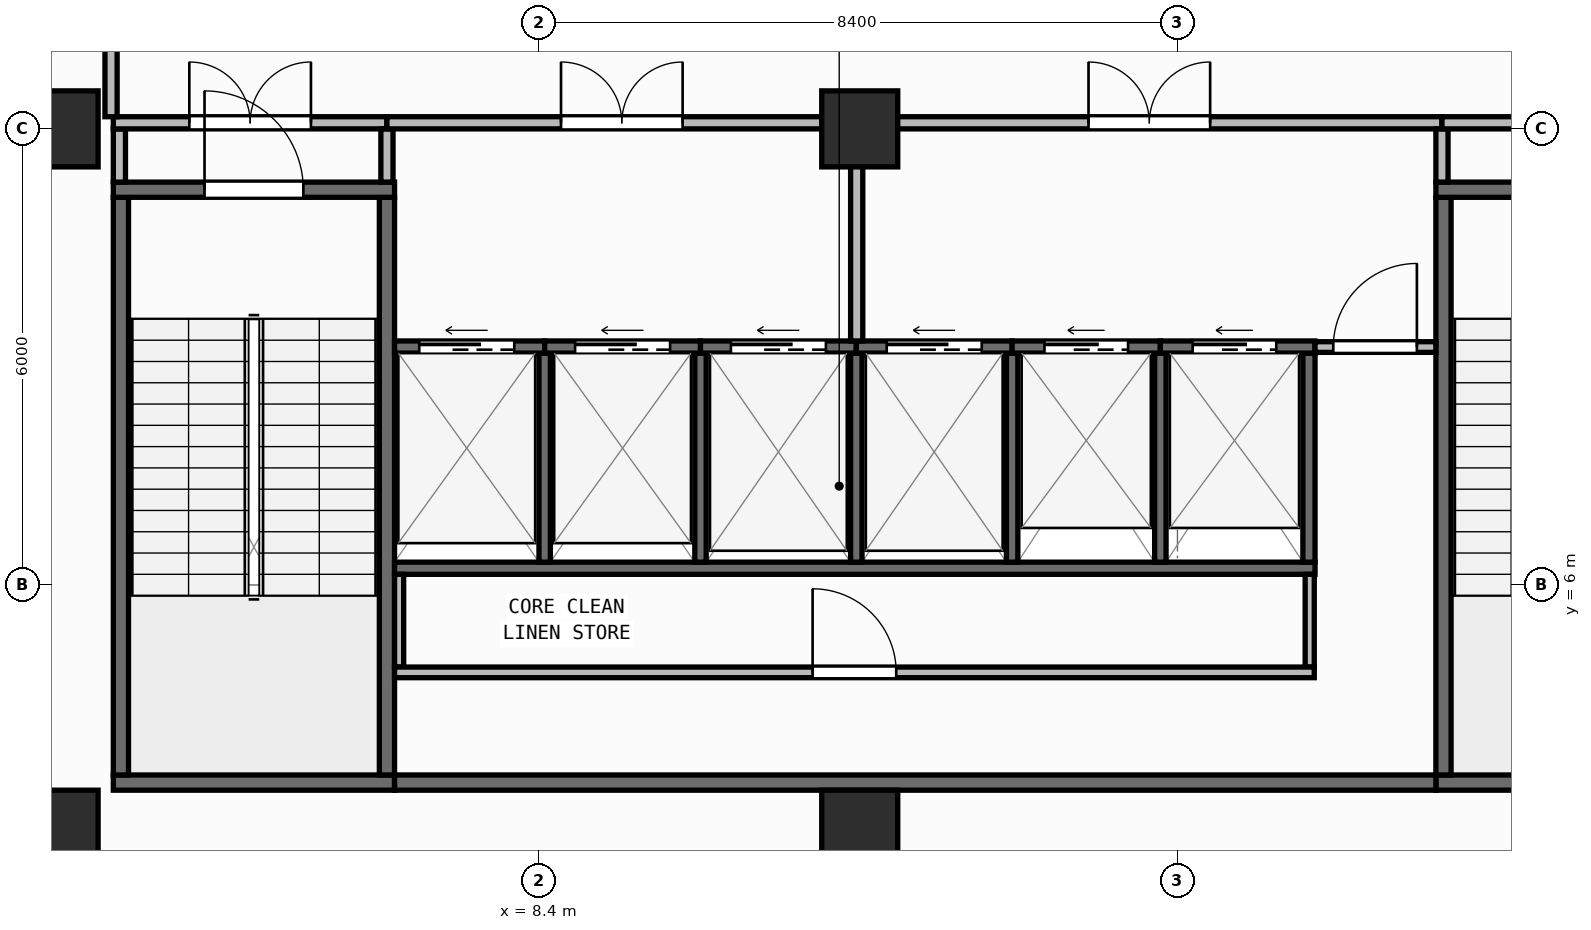
"""IFC4 building model, lengths in metres.
Left out: names, types, materials, properties, quantities, classifications, styles, units other than length and angle.
Written with IfcOpenShell. Run it as: python <this file> out.ifc"""

import sys

from ifc_helpers import new_model, si_unit, direction, frame, frame_2d, origin, origin_2d, place, context, subcontext, project, spatial, rectangle, extrude, element, fill, save


model = new_model("IFC4")
c1 = context("Model", 3, precision=1e-05, world=origin(), true_north=direction((0.0, 1.0)))
c2 = subcontext(c1, "Body", "Model", "MODEL_VIEW")
j1 = project(units=[si_unit("LENGTHUNIT", "METRE"), si_unit("PLANEANGLEUNIT", "RADIAN")], contexts=[c1])
p1 = place(None, origin())
s1 = spatial("IfcSite", under=j1, at=p1, CompositionType="ELEMENT")
p2 = place(p1, origin())
s2 = spatial("IfcBuilding", under=s1, at=p2, CompositionType="ELEMENT")
p3 = place(p2, frame((0.0, 0.0, 235.55)))
s3 = spatial("IfcBuildingStorey", under=s2, at=p3, CompositionType="ELEMENT", Elevation=235.55)
for number, where, z_axis, x_axis in (
    (1, (2.1, 2.8, 0.0), (0.0, 0.0, 1.0), (1.0, 0.0, 0.0)),
    (2, (12.62, 2.8, 0.0), (0.0, 0.0, 1.0), (1.0, 0.0, 0.0)),
    (3, (2.1, 12.0, 0.0), (0.0, 0.0, 1.0), (1.0, 0.0, 0.0)),
    (4, (12.62, 12.0, 0.0), (0.0, 0.0, 1.0), (1.0, 0.0, 0.0)),
):
    element("IfcColumn", number, at=place(p3, frame(where, z_axis=z_axis, x_axis=x_axis)), inside=s3, PredefinedType="COLUMN", context=c2, shape_type="SweptSolid", body=[
        extrude(rectangle(XDim=1.0, YDim=1.0, at=origin_2d()), origin(), (0.0, 0.0, 1.0), 5.2),
    ])
p4 = place(p3, frame((2.66, 0.174, 0.0), z_axis=(0.0, 0.0, 1.0), x_axis=(0.996611813627, 0.082248969229, 0.0)))
e5 = element("IfcWall", 5, at=p4, inside=s3, PredefinedType="STANDARD", context=c2, shape_type="SweptSolid", body=[
    extrude(rectangle(XDim=41.019, YDim=0.26, at=frame_2d((20.51, 0.0))), origin(), (0.0, 0.0, 1.0), 4.96),
])
p5 = place(p3, frame((2.8, 3.4, 0.0), z_axis=(0.0, 0.0, 1.0), x_axis=(1.0, 0.0, 0.0)))
e6 = element("IfcWall", 6, at=p5, inside=s3, PredefinedType="SHEAR", context=c2, shape_type="SweptSolid", body=[
    extrude(rectangle(XDim=3.7, YDim=0.2, at=frame_2d((1.85, 0.0))), origin(), (0.0, 0.0, 1.0), 4.96),
])
for number, where, z_axis, x_axis in (
    (7, (2.9, 3.5, 0.0), (0.0, 0.0, 1.0), (0.0, 1.0, 0.0)),
    (8, (6.4, 3.5, 0.0), (0.0, 0.0, 1.0), (0.0, 1.0, 0.0)),
):
    element("IfcWall", number, at=place(p3, frame(where, z_axis=z_axis, x_axis=x_axis)), inside=s3, PredefinedType="SHEAR", context=c2, shape_type="SweptSolid", body=[
        extrude(rectangle(XDim=7.6, YDim=0.2, at=frame_2d((3.8, 0.0))), origin(), (0.0, 0.0, 1.0), 4.96),
    ])
p6 = place(p3, frame((2.8, 11.2, 0.0), z_axis=(0.0, 0.0, 1.0), x_axis=(1.0, 0.0, 0.0)))
e9 = element("IfcWall", 9, at=p6, inside=s3, PredefinedType="SHEAR", context=c2, shape_type="SweptSolid", body=[
    extrude(rectangle(XDim=3.7, YDim=0.2, at=frame_2d((1.85, 0.0))), origin(), (0.0, 0.0, 1.0), 4.96),
])
p7 = place(p6, frame((1.2, 0.0, 0.0)))
e10 = element("IfcOpeningElement", 10, at=p7, cuts=e9, PredefinedType="OPENING", context=c2, shape_type="SweptSolid", body=[
    extrude(rectangle(XDim=1.3, YDim=2.15, at=frame_2d((0.65, 1.075))), frame((0.0, 0.11, 0.0), z_axis=(0.0, -1.0, 0.0), x_axis=(1.0, 0.0, 0.0)), (0.0, 0.0, 1.0), 0.22),
])
p8 = place(p3, frame((20.2, 3.4, 0.0), z_axis=(0.0, 0.0, 1.0), x_axis=(1.0, 0.0, 0.0)))
e11 = element("IfcWall", 11, at=p8, inside=s3, PredefinedType="SHEAR", context=c2, shape_type="SweptSolid", body=[
    extrude(rectangle(XDim=3.7, YDim=0.2, at=frame_2d((1.85, 0.0))), origin(), (0.0, 0.0, 1.0), 4.96),
])
p9 = place(p3, frame((20.3, 3.5, 0.0), z_axis=(0.0, 0.0, 1.0), x_axis=(0.0, 1.0, 0.0)))
e12 = element("IfcWall", 12, at=p9, inside=s3, PredefinedType="SHEAR", context=c2, shape_type="SweptSolid", body=[
    extrude(rectangle(XDim=7.6, YDim=0.2, at=frame_2d((3.8, 0.0))), origin(), (0.0, 0.0, 1.0), 4.96),
])
p10 = place(p3, frame((20.2, 11.2, 0.0), z_axis=(0.0, 0.0, 1.0), x_axis=(1.0, 0.0, 0.0)))
e13 = element("IfcWall", 13, at=p10, inside=s3, PredefinedType="SHEAR", context=c2, shape_type="SweptSolid", body=[
    extrude(rectangle(XDim=3.7, YDim=0.2, at=frame_2d((1.85, 0.0))), origin(), (0.0, 0.0, 1.0), 4.96),
])
p11 = place(p10, frame((1.2, 0.0, 0.0)))
e14 = element("IfcOpeningElement", 14, at=p11, cuts=e13, PredefinedType="OPENING", context=c2, shape_type="SweptSolid", body=[
    extrude(rectangle(XDim=1.3, YDim=2.15, at=frame_2d((0.65, 1.075))), frame((0.0, 0.11, 0.0), z_axis=(0.0, -1.0, 0.0), x_axis=(1.0, 0.0, 0.0)), (0.0, 0.0, 1.0), 0.22),
])
p12 = place(p3, frame((6.5, 3.4, 0.0), z_axis=(0.0, 0.0, 1.0), x_axis=(1.0, 0.0, 0.0)))
e15 = element("IfcWall", 15, at=p12, inside=s3, PredefinedType="SHEAR", context=c2, shape_type="SweptSolid", body=[
    extrude(rectangle(XDim=13.7, YDim=0.2, at=frame_2d((6.85, 0.0))), origin(), (0.0, 0.0, 1.0), 4.96),
])
p13 = place(p3, frame((6.5, 6.22, 0.0), z_axis=(0.0, 0.0, 1.0), x_axis=(1.0, 0.0, 0.0)))
e16 = element("IfcWall", 16, at=p13, inside=s3, PredefinedType="SHEAR", context=c2, shape_type="SweptSolid", body=[
    extrude(rectangle(XDim=12.11, YDim=0.16, at=frame_2d((6.055, 0.0))), origin(), (0.0, 0.0, 1.0), 4.96),
])
p14 = place(p3, frame((18.53, 6.3, 0.0), z_axis=(0.0, 0.0, 1.0), x_axis=(0.0, 1.0, 0.0)))
e17 = element("IfcWall", 17, at=p14, inside=s3, PredefinedType="SHEAR", context=c2, shape_type="SweptSolid", body=[
    extrude(rectangle(XDim=2.75, YDim=0.16, at=frame_2d((1.375, 0.0))), origin(), (0.0, 0.0, 1.0), 4.96),
])
for number, where, z_axis, x_axis in (
    (18, (8.475, 6.3, 0.0), (0.0, 0.0, 1.0), (0.0, 1.0, 0.0)),
    (19, (10.525, 6.3, 0.0), (0.0, 0.0, 1.0), (0.0, 1.0, 0.0)),
    (20, (12.575, 6.3, 0.0), (0.0, 0.0, 1.0), (0.0, 1.0, 0.0)),
    (21, (14.625, 6.3, 0.0), (0.0, 0.0, 1.0), (0.0, 1.0, 0.0)),
    (22, (16.575, 6.3, 0.0), (0.0, 0.0, 1.0), (0.0, 1.0, 0.0)),
):
    element("IfcWall", number, at=place(p3, frame(where, z_axis=z_axis, x_axis=x_axis)), inside=s3, PredefinedType="SHEAR", context=c2, shape_type="SweptSolid", body=[
        extrude(rectangle(XDim=2.75, YDim=0.15, at=frame_2d((1.375, 0.0))), origin(), (0.0, 0.0, 1.0), 4.96),
    ])
p15 = place(p3, frame((6.5, 9.13, 0.0), z_axis=(0.0, 0.0, 1.0), x_axis=(1.0, 0.0, 0.0)))
e23 = element("IfcWall", 23, at=p15, inside=s3, PredefinedType="SHEAR", context=c2, shape_type="SweptSolid", body=[
    extrude(rectangle(XDim=1.975, YDim=0.16, at=frame_2d((0.988, 0.0))), origin(), (0.0, 0.0, 1.0), 4.96),
])
p16 = place(p15, frame((0.325, 0.0, 0.0)))
e24 = element("IfcOpeningElement", 24, at=p16, cuts=e23, PredefinedType="OPENING", context=c2, shape_type="SweptSolid", body=[
    extrude(rectangle(XDim=1.25, YDim=2.15, at=frame_2d((0.625, 1.075))), frame((0.0, 0.09, 0.0), z_axis=(0.0, -1.0, 0.0), x_axis=(1.0, 0.0, 0.0)), (0.0, 0.0, 1.0), 0.18),
])
p17 = place(p3, frame((8.475, 9.13, 0.0), z_axis=(0.0, 0.0, 1.0), x_axis=(1.0, 0.0, 0.0)))
e25 = element("IfcWall", 25, at=p17, inside=s3, PredefinedType="SHEAR", context=c2, shape_type="SweptSolid", body=[
    extrude(rectangle(XDim=2.05, YDim=0.16, at=frame_2d((1.025, 0.0))), origin(), (0.0, 0.0, 1.0), 4.96),
])
p18 = place(p17, frame((0.4, 0.0, 0.0)))
e26 = element("IfcOpeningElement", 26, at=p18, cuts=e25, PredefinedType="OPENING", context=c2, shape_type="SweptSolid", body=[
    extrude(rectangle(XDim=1.25, YDim=2.15, at=frame_2d((0.625, 1.075))), frame((0.0, 0.09, 0.0), z_axis=(0.0, -1.0, 0.0), x_axis=(1.0, 0.0, 0.0)), (0.0, 0.0, 1.0), 0.18),
])
p19 = place(p3, frame((10.525, 9.13, 0.0), z_axis=(0.0, 0.0, 1.0), x_axis=(1.0, 0.0, 0.0)))
e27 = element("IfcWall", 27, at=p19, inside=s3, PredefinedType="SHEAR", context=c2, shape_type="SweptSolid", body=[
    extrude(rectangle(XDim=2.05, YDim=0.16, at=frame_2d((1.025, 0.0))), origin(), (0.0, 0.0, 1.0), 4.96),
])
p20 = place(p19, frame((0.4, 0.0, 0.0)))
e28 = element("IfcOpeningElement", 28, at=p20, cuts=e27, PredefinedType="OPENING", context=c2, shape_type="SweptSolid", body=[
    extrude(rectangle(XDim=1.25, YDim=2.15, at=frame_2d((0.625, 1.075))), frame((0.0, 0.09, 0.0), z_axis=(0.0, -1.0, 0.0), x_axis=(1.0, 0.0, 0.0)), (0.0, 0.0, 1.0), 0.18),
])
p21 = place(p3, frame((12.575, 9.13, 0.0), z_axis=(0.0, 0.0, 1.0), x_axis=(1.0, 0.0, 0.0)))
e29 = element("IfcWall", 29, at=p21, inside=s3, PredefinedType="SHEAR", context=c2, shape_type="SweptSolid", body=[
    extrude(rectangle(XDim=2.05, YDim=0.16, at=frame_2d((1.025, 0.0))), origin(), (0.0, 0.0, 1.0), 4.96),
])
p22 = place(p21, frame((0.4, 0.0, 0.0)))
e30 = element("IfcOpeningElement", 30, at=p22, cuts=e29, PredefinedType="OPENING", context=c2, shape_type="SweptSolid", body=[
    extrude(rectangle(XDim=1.25, YDim=2.15, at=frame_2d((0.625, 1.075))), frame((0.0, 0.09, 0.0), z_axis=(0.0, -1.0, 0.0), x_axis=(1.0, 0.0, 0.0)), (0.0, 0.0, 1.0), 0.18),
])
p23 = place(p3, frame((14.625, 9.13, 0.0), z_axis=(0.0, 0.0, 1.0), x_axis=(1.0, 0.0, 0.0)))
e31 = element("IfcWall", 31, at=p23, inside=s3, PredefinedType="SHEAR", context=c2, shape_type="SweptSolid", body=[
    extrude(rectangle(XDim=1.95, YDim=0.16, at=frame_2d((0.975, 0.0))), origin(), (0.0, 0.0, 1.0), 4.96),
])
p24 = place(p23, frame((0.425, 0.0, 0.0)))
e32 = element("IfcOpeningElement", 32, at=p24, cuts=e31, PredefinedType="OPENING", context=c2, shape_type="SweptSolid", body=[
    extrude(rectangle(XDim=1.1, YDim=2.15, at=frame_2d((0.55, 1.075))), frame((0.0, 0.09, 0.0), z_axis=(0.0, -1.0, 0.0), x_axis=(1.0, 0.0, 0.0)), (0.0, 0.0, 1.0), 0.18),
])
p25 = place(p3, frame((16.575, 9.13, 0.0), z_axis=(0.0, 0.0, 1.0), x_axis=(1.0, 0.0, 0.0)))
e33 = element("IfcWall", 33, at=p25, inside=s3, PredefinedType="SHEAR", context=c2, shape_type="SweptSolid", body=[
    extrude(rectangle(XDim=2.035, YDim=0.16, at=frame_2d((1.018, 0.0))), origin(), (0.0, 0.0, 1.0), 4.96),
])
p26 = place(p25, frame((0.425, 0.0, 0.0)))
e34 = element("IfcOpeningElement", 34, at=p26, cuts=e33, PredefinedType="OPENING", context=c2, shape_type="SweptSolid", body=[
    extrude(rectangle(XDim=1.1, YDim=2.15, at=frame_2d((0.55, 1.075))), frame((0.0, 0.09, 0.0), z_axis=(0.0, -1.0, 0.0), x_axis=(1.0, 0.0, 0.0)), (0.0, 0.0, 1.0), 0.18),
])
for number, where, z_axis, x_axis in (
    (35, (6.56, 4.92, 0.0), (0.0, 0.0, 1.0), (0.0, 1.0, 0.0)),
    (36, (18.54, 4.92, 0.0), (0.0, 0.0, 1.0), (0.0, 1.0, 0.0)),
):
    element("IfcWall", number, at=place(p3, frame(where, z_axis=z_axis, x_axis=x_axis)), inside=s3, PredefinedType="PARTITIONING", context=c2, shape_type="SweptSolid", body=[
        extrude(rectangle(XDim=1.22, YDim=0.12, at=frame_2d((0.61, 0.0))), origin(), (0.0, 0.0, 1.0), 4.96),
    ])
p27 = place(p3, frame((6.5, 4.85, 0.0), z_axis=(0.0, 0.0, 1.0), x_axis=(1.0, 0.0, 0.0)))
e37 = element("IfcWall", 37, at=p27, inside=s3, PredefinedType="PARTITIONING", context=c2, shape_type="SweptSolid", body=[
    extrude(rectangle(XDim=12.1, YDim=0.14, at=frame_2d((6.05, 0.0))), origin(), (0.0, 0.0, 1.0), 4.96),
])
p28 = place(p27, frame((5.5, 0.0, 0.0)))
e38 = element("IfcOpeningElement", 38, at=p28, cuts=e37, PredefinedType="OPENING", context=c2, shape_type="SweptSolid", body=[
    extrude(rectangle(XDim=1.1, YDim=2.1, at=frame_2d((0.55, 1.05))), frame((0.0, 0.08, 0.0), z_axis=(0.0, -1.0, 0.0), x_axis=(1.0, 0.0, 0.0)), (0.0, 0.0, 1.0), 0.16),
])
p29 = place(p3, frame((18.61, 9.13, 0.0), z_axis=(0.0, 0.0, 1.0), x_axis=(1.0, 0.0, 0.0)))
e39 = element("IfcWall", 39, at=p29, inside=s3, PredefinedType="PARTITIONING", context=c2, shape_type="SweptSolid", body=[
    extrude(rectangle(XDim=1.59, YDim=0.14, at=frame_2d((0.795, 0.0))), origin(), (0.0, 0.0, 1.0), 4.96),
])
p30 = place(p29, frame((0.24, 0.0, 0.0)))
e40 = element("IfcOpeningElement", 40, at=p30, cuts=e39, PredefinedType="OPENING", context=c2, shape_type="SweptSolid", body=[
    extrude(rectangle(XDim=1.1, YDim=2.1, at=frame_2d((0.55, 1.05))), frame((0.0, 0.08, 0.0), z_axis=(0.0, -1.0, 0.0), x_axis=(1.0, 0.0, 0.0)), (0.0, 0.0, 1.0), 0.16),
])
p31 = place(p3, frame((2.88, 11.3, 0.0), z_axis=(0.0, 0.0, 1.0), x_axis=(0.0, 1.0, 0.0)))
e41 = element("IfcWall", 41, at=p31, inside=s3, PredefinedType="PARTITIONING", context=c2, shape_type="SweptSolid", body=[
    extrude(rectangle(XDim=0.7, YDim=0.16, at=frame_2d((0.35, 0.0))), origin(), (0.0, 0.0, 1.0), 4.96),
])
p32 = place(p3, frame((2.8, 12.08, 0.0), z_axis=(0.0, 0.0, 1.0), x_axis=(1.0, 0.0, 0.0)))
e42 = element("IfcWall", 42, at=p32, inside=s3, PredefinedType="PARTITIONING", context=c2, shape_type="SweptSolid", body=[
    extrude(rectangle(XDim=3.6, YDim=0.16, at=frame_2d((1.8, 0.0))), origin(), (0.0, 0.0, 1.0), 4.235),
])
p33 = place(p32, frame((1.0, 0.0, 0.0)))
e43 = element("IfcOpeningElement", 43, at=p33, cuts=e42, PredefinedType="OPENING", context=c2, shape_type="SweptSolid", body=[
    extrude(rectangle(XDim=1.6, YDim=2.05, at=frame_2d((0.8, 1.025))), frame((0.0, 0.09, 0.0), z_axis=(0.0, -1.0, 0.0), x_axis=(1.0, 0.0, 0.0)), (0.0, 0.0, 1.0), 0.18),
])
p34 = place(p3, frame((6.4, 11.3, 0.0), z_axis=(0.0, 0.0, 1.0), x_axis=(0.0, 1.0, 0.0)))
e44 = element("IfcWall", 44, at=p34, inside=s3, PredefinedType="PARTITIONING", context=c2, shape_type="SweptSolid", body=[
    extrude(rectangle(XDim=0.7, YDim=0.16, at=frame_2d((0.35, 0.0))), origin(), (0.0, 0.0, 1.0), 4.96),
])
p35 = place(p3, frame((6.4, 12.08, 0.0), z_axis=(0.0, 0.0, 1.0), x_axis=(1.0, 0.0, 0.0)))
e45 = element("IfcWall", 45, at=p35, inside=s3, PredefinedType="PARTITIONING", context=c2, shape_type="SweptSolid", body=[
    extrude(rectangle(XDim=6.18, YDim=0.16, at=frame_2d((3.09, 0.0))), origin(), (0.0, 0.0, 1.0), 4.235),
])
p36 = place(p35, frame((2.29, 0.0, 0.0)))
e46 = element("IfcOpeningElement", 46, at=p36, cuts=e45, PredefinedType="OPENING", context=c2, shape_type="SweptSolid", body=[
    extrude(rectangle(XDim=1.6, YDim=2.05, at=frame_2d((0.8, 1.025))), frame((0.0, 0.09, 0.0), z_axis=(0.0, -1.0, 0.0), x_axis=(1.0, 0.0, 0.0)), (0.0, 0.0, 1.0), 0.18),
])
p37 = place(p3, frame((12.58, 9.21, 0.0), z_axis=(0.0, 0.0, 1.0), x_axis=(0.0, 1.0, 0.0)))
e47 = element("IfcWall", 47, at=p37, inside=s3, PredefinedType="PARTITIONING", context=c2, shape_type="SweptSolid", body=[
    extrude(rectangle(XDim=2.79, YDim=0.16, at=frame_2d((1.395, 0.0))), origin(), (0.0, 0.0, 1.0), 4.96),
])
p38 = place(p3, frame((12.58, 12.08, 0.0), z_axis=(0.0, 0.0, 1.0), x_axis=(1.0, 0.0, 0.0)))
e48 = element("IfcWall", 48, at=p38, inside=s3, PredefinedType="PARTITIONING", context=c2, shape_type="SweptSolid", body=[
    extrude(rectangle(XDim=7.7, YDim=0.16, at=frame_2d((3.85, 0.0))), origin(), (0.0, 0.0, 1.0), 4.235),
])
p39 = place(p38, frame((3.05, 0.0, 0.0)))
e49 = element("IfcOpeningElement", 49, at=p39, cuts=e48, PredefinedType="OPENING", context=c2, shape_type="SweptSolid", body=[
    extrude(rectangle(XDim=1.6, YDim=2.05, at=frame_2d((0.8, 1.025))), frame((0.0, 0.09, 0.0), z_axis=(0.0, -1.0, 0.0), x_axis=(1.0, 0.0, 0.0)), (0.0, 0.0, 1.0), 0.18),
])
p40 = place(p3, frame((20.28, 11.3, 0.0), z_axis=(0.0, 0.0, 1.0), x_axis=(0.0, 1.0, 0.0)))
e50 = element("IfcWall", 50, at=p40, inside=s3, PredefinedType="PARTITIONING", context=c2, shape_type="SweptSolid", body=[
    extrude(rectangle(XDim=0.7, YDim=0.16, at=frame_2d((0.35, 0.0))), origin(), (0.0, 0.0, 1.0), 4.96),
])
p41 = place(p3, frame((20.28, 12.08, 0.0), z_axis=(0.0, 0.0, 1.0), x_axis=(1.0, 0.0, 0.0)))
e51 = element("IfcWall", 51, at=p41, inside=s3, PredefinedType="PARTITIONING", context=c2, shape_type="SweptSolid", body=[
    extrude(rectangle(XDim=3.62, YDim=0.16, at=frame_2d((1.81, 0.0))), origin(), (0.0, 0.0, 1.0), 4.235),
])
p42 = place(p41, frame((1.01, 0.0, 0.0)))
e52 = element("IfcOpeningElement", 52, at=p42, cuts=e51, PredefinedType="OPENING", context=c2, shape_type="SweptSolid", body=[
    extrude(rectangle(XDim=1.6, YDim=2.05, at=frame_2d((0.8, 1.025))), frame((0.0, 0.09, 0.0), z_axis=(0.0, -1.0, 0.0), x_axis=(1.0, 0.0, 0.0)), (0.0, 0.0, 1.0), 0.18),
])
p43 = place(p3, frame((2.77, 12.16, 0.0), z_axis=(0.0, 0.0, 1.0), x_axis=(0.0, 1.0, 0.0)))
e53 = element("IfcWall", 53, at=p43, inside=s3, PredefinedType="PARTITIONING", context=c2, shape_type="SweptSolid", body=[
    extrude(rectangle(XDim=16.04, YDim=0.16, at=frame_2d((8.02, 0.0))), origin(), (0.0, 0.0, 1.0), 4.96),
])
p44 = place(p7, origin())
e54 = element("IfcDoor", 54, at=p44, inside=s3, OperationType="SINGLE_SWING_LEFT", PredefinedType="DOOR", context=c2, shape_type="SweptSolid", body=[
    extrude(rectangle(XDim=1.3, YDim=2.15, at=frame_2d((0.65, 1.075))), frame((0.0, 0.025, 0.0), z_axis=(0.0, -1.0, 0.0), x_axis=(1.0, 0.0, 0.0)), (0.0, 0.0, 1.0), 0.05),
])
fill(e10, e54)
p45 = place(p16, origin())
e55 = element("IfcDoor", 55, at=p45, inside=s3, OperationType="SLIDING_TO_LEFT", PredefinedType="DOOR", context=c2, shape_type="SweptSolid", body=[
    extrude(rectangle(XDim=1.25, YDim=2.15, at=frame_2d((0.625, 1.075))), frame((0.0, 0.025, 0.0), z_axis=(0.0, -1.0, 0.0), x_axis=(1.0, 0.0, 0.0)), (0.0, 0.0, 1.0), 0.05),
])
fill(e24, e55)
p46 = place(p18, origin())
e56 = element("IfcDoor", 56, at=p46, inside=s3, OperationType="SLIDING_TO_LEFT", PredefinedType="DOOR", context=c2, shape_type="SweptSolid", body=[
    extrude(rectangle(XDim=1.25, YDim=2.15, at=frame_2d((0.625, 1.075))), frame((0.0, 0.025, 0.0), z_axis=(0.0, -1.0, 0.0), x_axis=(1.0, 0.0, 0.0)), (0.0, 0.0, 1.0), 0.05),
])
fill(e26, e56)
p47 = place(p20, origin())
e57 = element("IfcDoor", 57, at=p47, inside=s3, OperationType="SLIDING_TO_LEFT", PredefinedType="DOOR", context=c2, shape_type="SweptSolid", body=[
    extrude(rectangle(XDim=1.25, YDim=2.15, at=frame_2d((0.625, 1.075))), frame((0.0, 0.025, 0.0), z_axis=(0.0, -1.0, 0.0), x_axis=(1.0, 0.0, 0.0)), (0.0, 0.0, 1.0), 0.05),
])
fill(e28, e57)
p48 = place(p22, origin())
e58 = element("IfcDoor", 58, at=p48, inside=s3, OperationType="SLIDING_TO_LEFT", PredefinedType="DOOR", context=c2, shape_type="SweptSolid", body=[
    extrude(rectangle(XDim=1.25, YDim=2.15, at=frame_2d((0.625, 1.075))), frame((0.0, 0.025, 0.0), z_axis=(0.0, -1.0, 0.0), x_axis=(1.0, 0.0, 0.0)), (0.0, 0.0, 1.0), 0.05),
])
fill(e30, e58)
p49 = place(p24, origin())
e59 = element("IfcDoor", 59, at=p49, inside=s3, OperationType="SLIDING_TO_LEFT", PredefinedType="DOOR", context=c2, shape_type="SweptSolid", body=[
    extrude(rectangle(XDim=1.1, YDim=2.15, at=frame_2d((0.55, 1.075))), frame((0.0, 0.025, 0.0), z_axis=(0.0, -1.0, 0.0), x_axis=(1.0, 0.0, 0.0)), (0.0, 0.0, 1.0), 0.05),
])
fill(e32, e59)
p50 = place(p26, origin())
e60 = element("IfcDoor", 60, at=p50, inside=s3, OperationType="SLIDING_TO_LEFT", PredefinedType="DOOR", context=c2, shape_type="SweptSolid", body=[
    extrude(rectangle(XDim=1.1, YDim=2.15, at=frame_2d((0.55, 1.075))), frame((0.0, 0.025, 0.0), z_axis=(0.0, -1.0, 0.0), x_axis=(1.0, 0.0, 0.0)), (0.0, 0.0, 1.0), 0.05),
])
fill(e34, e60)
p51 = place(p28, origin())
e61 = element("IfcDoor", 61, at=p51, inside=s3, OperationType="SINGLE_SWING_LEFT", PredefinedType="DOOR", context=c2, shape_type="SweptSolid", body=[
    extrude(rectangle(XDim=1.1, YDim=2.1, at=frame_2d((0.55, 1.05))), frame((0.0, 0.025, 0.0), z_axis=(0.0, -1.0, 0.0), x_axis=(1.0, 0.0, 0.0)), (0.0, 0.0, 1.0), 0.05),
])
fill(e38, e61)
p52 = place(p30, origin())
e62 = element("IfcDoor", 62, at=p52, inside=s3, OperationType="SINGLE_SWING_RIGHT", PredefinedType="DOOR", context=c2, shape_type="SweptSolid", body=[
    extrude(rectangle(XDim=1.1, YDim=2.1, at=frame_2d((0.55, 1.05))), frame((0.0, 0.025, 0.0), z_axis=(0.0, -1.0, 0.0), x_axis=(1.0, 0.0, 0.0)), (0.0, 0.0, 1.0), 0.05),
])
fill(e40, e62)
p53 = place(p33, origin())
e63 = element("IfcDoor", 63, at=p53, inside=s3, OperationType="DOUBLE_DOOR_SINGLE_SWING", PredefinedType="DOOR", context=c2, shape_type="SweptSolid", body=[
    extrude(rectangle(XDim=1.6, YDim=2.05, at=frame_2d((0.8, 1.025))), frame((0.0, 0.025, 0.0), z_axis=(0.0, -1.0, 0.0), x_axis=(1.0, 0.0, 0.0)), (0.0, 0.0, 1.0), 0.05),
])
fill(e43, e63)
p54 = place(p36, origin())
e64 = element("IfcDoor", 64, at=p54, inside=s3, OperationType="DOUBLE_DOOR_SINGLE_SWING", PredefinedType="DOOR", context=c2, shape_type="SweptSolid", body=[
    extrude(rectangle(XDim=1.6, YDim=2.05, at=frame_2d((0.8, 1.025))), frame((0.0, 0.025, 0.0), z_axis=(0.0, -1.0, 0.0), x_axis=(1.0, 0.0, 0.0)), (0.0, 0.0, 1.0), 0.05),
])
fill(e46, e64)
p55 = place(p39, origin())
e65 = element("IfcDoor", 65, at=p55, inside=s3, OperationType="DOUBLE_DOOR_SINGLE_SWING", PredefinedType="DOOR", context=c2, shape_type="SweptSolid", body=[
    extrude(rectangle(XDim=1.6, YDim=2.05, at=frame_2d((0.8, 1.025))), frame((0.0, 0.025, 0.0), z_axis=(0.0, -1.0, 0.0), x_axis=(1.0, 0.0, 0.0)), (0.0, 0.0, 1.0), 0.05),
])
fill(e49, e65)
save(model, sys.argv[1])
